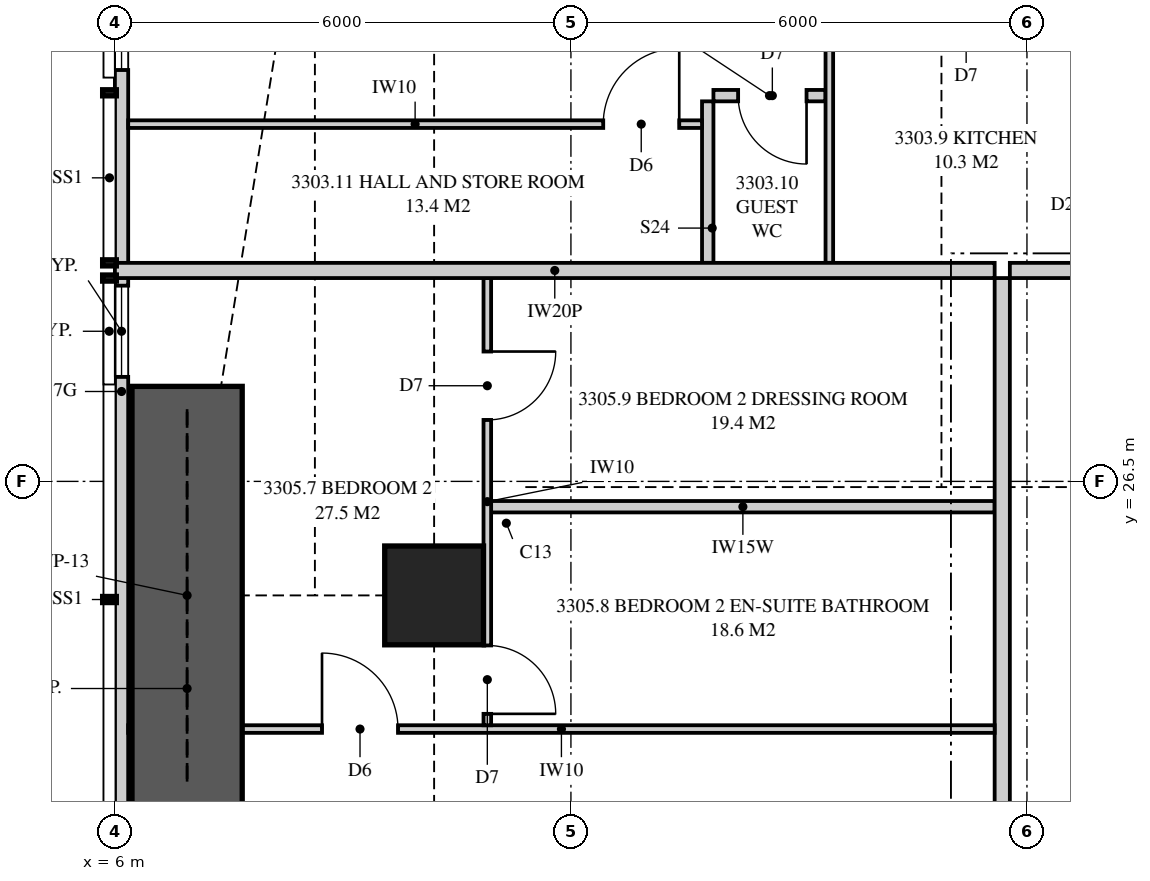
"""IFC4 building model, lengths in metres.
Left out: names, types, materials, properties, quantities, classifications, styles, units other than length and angle.
Written with IfcOpenShell. Run it as: python <this file> out.ifc"""

import sys

from ifc_helpers import new_model, si_unit, direction, frame, frame_2d, origin, origin_2d, place, context, subcontext, project, spatial, polyline, rectangle, outline, extrude, element, fill, save


model = new_model("IFC4")
c1 = context("Model", 3, precision=1e-05, world=origin(), true_north=direction((0.0, 1.0)))
c2 = subcontext(c1, "Body", "Model", "MODEL_VIEW")
j1 = project(units=[si_unit("LENGTHUNIT", "METRE"), si_unit("PLANEANGLEUNIT", "RADIAN")], contexts=[c1])
p1 = place(None, origin())
s1 = spatial("IfcSite", under=j1, at=p1, CompositionType="ELEMENT")
p2 = place(p1, origin())
s2 = spatial("IfcBuilding", under=s1, at=p2, CompositionType="ELEMENT")
p3 = place(p2, frame((0.0, 0.0, 121.6)))
s3 = spatial("IfcBuildingStorey", under=s2, at=p3, CompositionType="ELEMENT", Elevation=121.6)
p4 = place(p3, frame((10.2, 25.0, 0.0), z_axis=(0.0, 0.0, 1.0), x_axis=(1.0, 0.0, 0.0)))
e1 = element("IfcColumn", 1, at=p4, inside=s3, PredefinedType="COLUMN", context=c2, shape_type="SweptSolid", body=[
    extrude(rectangle(XDim=1.3, YDim=1.3, at=origin_2d()), origin(), (0.0, 0.0, 1.0), 3.35),
])
p5 = place(p3, frame((6.087, 34.949, 0.0), z_axis=(0.0, 0.0, 1.0), x_axis=(0.0, -1.0, 0.0)))
e2 = element("IfcWall", 2, at=p5, inside=s3, PredefinedType="SOLIDWALL", context=c2, shape_type="SweptSolid", body=[
    extrude(outline(polyline([(0.0, 0.0), (14.532, 0.0), (14.532, 2.15), (9.949, 2.15), (9.949, 3.11), (9.823, 3.11), (9.823, 2.15), (9.73, 2.15), (9.73, 3.11), (0.0, 3.11), (0.0, 0.0)])), frame((0.0, 0.087, 0.0), z_axis=(0.0, -1.0, 0.0), x_axis=(1.0, 0.0, 0.0)), (0.0, 0.0, 1.0), 0.175),
])
p6 = place(p5, frame((0.636, 0.0, 0.4)))
e3 = element("IfcOpeningElement", 3, at=p6, cuts=e2, PredefinedType="OPENING", context=c2, shape_type="SweptSolid", body=[
    extrude(rectangle(XDim=2.4, YDim=1.7, at=frame_2d((1.2, 0.85))), frame((0.0, 0.097, 0.0), z_axis=(0.0, -1.0, 0.0), x_axis=(1.0, 0.0, 0.0)), (0.0, 0.0, 1.0), 0.195),
])
p7 = place(p5, frame((5.874, 0.0, 0.4)))
e4 = element("IfcOpeningElement", 4, at=p7, cuts=e2, PredefinedType="OPENING", context=c2, shape_type="SweptSolid", body=[
    extrude(rectangle(XDim=1.2, YDim=1.7, at=frame_2d((0.6, 0.85))), frame((0.0, 0.097, 0.0), z_axis=(0.0, -1.0, 0.0), x_axis=(1.0, 0.0, 0.0)), (0.0, 0.0, 1.0), 0.195),
])
p8 = place(p3, frame((17.775, 29.275, 0.0), z_axis=(0.0, 0.0, 1.0), x_axis=(1.0, 0.0, 0.0)))
e5 = element("IfcWall", 5, at=p8, inside=s3, PredefinedType="PARTITIONING", context=c2, shape_type="SweptSolid", body=[
    extrude(outline(polyline([(0.0, 0.0), (18.925, 0.0), (18.925, 3.11), (10.312, 3.11), (10.312, 2.541), (9.638, 2.541), (9.638, 3.11), (0.0, 3.11), (0.0, 0.0)])), frame((0.0, 0.1, 0.0), z_axis=(0.0, -1.0, 0.0), x_axis=(1.0, 0.0, 0.0)), (0.0, 0.0, 1.0), 0.2),
])
p9 = place(p8, frame((3.125, 0.0, 0.0)))
e6 = element("IfcOpeningElement", 6, at=p9, cuts=e5, PredefinedType="OPENING", context=c2, shape_type="SweptSolid", body=[
    extrude(rectangle(XDim=1.05, YDim=2.2, at=frame_2d((0.525, 1.1))), frame((0.0, 0.11, 0.0), z_axis=(0.0, -1.0, 0.0), x_axis=(1.0, 0.0, 0.0)), (0.0, 0.0, 1.0), 0.22),
])
p10 = place(p3, frame((15.4, 32.325, 0.0), z_axis=(0.0, 0.0, 1.0), x_axis=(0.0, -1.0, 0.0)))
e7 = element("IfcWall", 7, at=p10, inside=s3, PredefinedType="PARTITIONING", context=c2, shape_type="SweptSolid", body=[
    extrude(rectangle(XDim=2.95, YDim=0.1, at=frame_2d((1.475, 0.0))), origin(), (0.0, 0.0, 1.0), 3.11),
])
p11 = place(p3, frame((13.875, 31.575, 0.0), z_axis=(0.0, 0.0, 1.0), x_axis=(1.0, 0.0, 0.0)))
e8 = element("IfcWall", 8, at=p11, inside=s3, PredefinedType="PLUMBINGWALL", context=c2, shape_type="SweptSolid", body=[
    extrude(rectangle(XDim=1.475, YDim=0.15, at=frame_2d((0.738, 0.0))), origin(), (0.0, 0.0, 1.0), 3.11),
])
p12 = place(p11, frame((0.325, 0.0, 0.0)))
e9 = element("IfcOpeningElement", 9, at=p12, cuts=e8, PredefinedType="OPENING", context=c2, shape_type="SweptSolid", body=[
    extrude(rectangle(XDim=0.9, YDim=2.1, at=frame_2d((0.45, 1.05))), frame((0.0, 0.085, 0.0), z_axis=(0.0, -1.0, 0.0), x_axis=(1.0, 0.0, 0.0)), (0.0, 0.0, 1.0), 0.17),
])
p13 = place(p3, frame((13.8, 31.5, 0.0), z_axis=(0.0, 0.0, 1.0), x_axis=(0.0, -1.0, 0.0)))
e10 = element("IfcWall", 10, at=p13, inside=s3, PredefinedType="PLUMBINGWALL", context=c2, shape_type="SweptSolid", body=[
    extrude(rectangle(XDim=2.125, YDim=0.15, at=frame_2d((1.062, 0.0))), origin(), (0.0, 0.0, 1.0), 3.11),
])
p14 = place(p3, frame((6.175, 31.2, 0.0), z_axis=(0.0, 0.0, 1.0), x_axis=(1.0, 0.0, 0.0)))
e11 = element("IfcWall", 11, at=p14, inside=s3, PredefinedType="PARTITIONING", context=c2, shape_type="SweptSolid", body=[
    extrude(outline(polyline([(0.0, 0.0), (7.55, 0.0), (7.55, 3.11), (5.285, 3.11), (5.285, 2.51), (2.765, 2.51), (2.765, 3.11), (2.744, 3.11), (2.744, 2.541), (2.652, 2.541), (2.652, 2.15), (0.909, 2.15), (0.909, 3.11), (0.0, 3.11), (0.0, 0.0)])), frame((0.0, 0.05, 0.0), z_axis=(0.0, -1.0, 0.0), x_axis=(1.0, 0.0, 0.0)), (0.0, 0.0, 1.0), 0.1),
])
p15 = place(p14, frame((6.25, 0.0, 0.0)))
e12 = element("IfcOpeningElement", 12, at=p15, cuts=e11, PredefinedType="OPENING", context=c2, shape_type="SweptSolid", body=[
    extrude(rectangle(XDim=1.0, YDim=2.1, at=frame_2d((0.5, 1.05))), frame((0.0, 0.06, 0.0), z_axis=(0.0, -1.0, 0.0), x_axis=(1.0, 0.0, 0.0)), (0.0, 0.0, 1.0), 0.12),
])
p16 = place(p3, frame((6.0, 29.275, 0.0), z_axis=(0.0, 0.0, 1.0), x_axis=(1.0, 0.0, 0.0)))
e13 = element("IfcWall", 13, at=p16, inside=s3, PredefinedType="PARTITIONING", context=c2, shape_type="SweptSolid", body=[
    extrude(outline(polyline([(0.0, 0.0), (11.575, 0.0), (11.575, 3.11), (11.212, 3.11), (11.212, 2.541), (10.538, 2.541), (10.538, 3.11), (5.51, 3.11), (5.51, 2.51), (2.969, 2.51), (2.969, 2.541), (2.565, 2.541), (2.565, 2.15), (0.721, 2.15), (0.721, 3.11), (0.0, 3.11), (0.0, 0.0)])), frame((0.0, 0.1, 0.0), z_axis=(0.0, -1.0, 0.0), x_axis=(1.0, 0.0, 0.0)), (0.0, 0.0, 1.0), 0.2),
])
p17 = place(p3, frame((6.175, 23.242, 0.0), z_axis=(0.0, 0.0, 1.0), x_axis=(1.0, 0.0, 0.0)))
e14 = element("IfcWall", 14, at=p17, inside=s3, PredefinedType="PARTITIONING", context=c2, shape_type="SweptSolid", body=[
    extrude(outline(polyline([(0.529, 2.15), (0.0, 2.15), (0.0, 0.0), (0.529, 0.0), (0.529, 0.268), (1.021, 0.268), (1.021, 0.0), (11.4, 0.0), (11.4, 3.11), (5.285, 3.11), (5.285, 2.51), (2.765, 2.51), (2.765, 3.11), (1.635, 3.11), (1.635, 2.15), (1.021, 2.15), (1.021, 1.882), (0.529, 1.882), (0.529, 2.15)])), frame((0.0, 0.05, 0.0), z_axis=(0.0, -1.0, 0.0), x_axis=(1.0, 0.0, 0.0)), (0.0, 0.0, 1.0), 0.1),
])
p18 = place(p17, frame((2.55, 0.0, 0.0)))
e15 = element("IfcOpeningElement", 15, at=p18, cuts=e14, PredefinedType="OPENING", context=c2, shape_type="SweptSolid", body=[
    extrude(rectangle(XDim=1.0, YDim=2.1, at=frame_2d((0.5, 1.05))), frame((0.0, 0.06, 0.0), z_axis=(0.0, -1.0, 0.0), x_axis=(1.0, 0.0, 0.0)), (0.0, 0.0, 1.0), 0.12),
])
p19 = place(p3, frame((17.675, 19.7, 0.0), z_axis=(0.0, 0.0, 1.0), x_axis=(0.0, 1.0, 0.0)))
e16 = element("IfcWall", 16, at=p19, inside=s3, PredefinedType="PARTITIONING", context=c2, shape_type="SweptSolid", body=[
    extrude(outline(polyline([(0.0, 0.0), (9.475, 0.0), (9.475, 3.11), (7.062, 3.11), (7.062, 2.541), (6.388, 2.541), (6.388, 3.11), (0.0, 3.11), (0.0, 0.0)])), frame((0.0, 0.1, 0.0), z_axis=(0.0, -1.0, 0.0), x_axis=(1.0, 0.0, 0.0)), (0.0, 0.0, 1.0), 0.2),
])
p20 = place(p3, frame((10.9, 23.292, 0.0), z_axis=(0.0, 0.0, 1.0), x_axis=(0.0, 1.0, 0.0)))
e17 = element("IfcWall", 17, at=p20, inside=s3, PredefinedType="PARTITIONING", context=c2, shape_type="SweptSolid", body=[
    extrude(outline(polyline([(0.0, 0.0), (5.883, 0.0), (5.883, 3.11), (5.883, 2.51), (1.768, 2.51), (0.0, 2.51), (0.0, 3.11), (0.0, 0.0)])), frame((0.0, 0.05, 0.0), z_axis=(0.0, -1.0, 0.0), x_axis=(1.0, 0.0, 0.0)), (0.0, 0.0, 1.0), 0.1),
])
p21 = place(p20, frame((0.15, 0.0, 0.0)))
e18 = element("IfcOpeningElement", 18, at=p21, cuts=e17, PredefinedType="OPENING", context=c2, shape_type="SweptSolid", body=[
    extrude(rectangle(XDim=0.9, YDim=2.1, at=frame_2d((0.45, 1.05))), frame((0.0, 0.06, 0.0), z_axis=(0.0, -1.0, 0.0), x_axis=(1.0, 0.0, 0.0)), (0.0, 0.0, 1.0), 0.12),
])
p22 = place(p20, frame((4.017, 0.0, 0.0)))
e19 = element("IfcOpeningElement", 19, at=p22, cuts=e17, PredefinedType="OPENING", context=c2, shape_type="SweptSolid", body=[
    extrude(rectangle(XDim=0.9, YDim=2.1, at=frame_2d((0.45, 1.05))), frame((0.0, 0.06, 0.0), z_axis=(0.0, -1.0, 0.0), x_axis=(1.0, 0.0, 0.0)), (0.0, 0.0, 1.0), 0.12),
])
p23 = place(p3, frame((10.95, 26.167, 0.0), z_axis=(0.0, 0.0, 1.0), x_axis=(1.0, 0.0, 0.0)))
e20 = element("IfcWall", 20, at=p23, inside=s3, PredefinedType="PLUMBINGWALL", context=c2, shape_type="SweptSolid", body=[
    extrude(outline(polyline([(0.0, 0.0), (6.625, 0.0), (6.625, 3.11), (6.625, 2.541), (0.535, 2.541), (0.535, 2.51), (0.0, 2.51), (0.0, 3.11), (0.0, 0.0)])), frame((0.0, 0.075, 0.0), z_axis=(0.0, -1.0, 0.0), x_axis=(1.0, 0.0, 0.0)), (0.0, 0.0, 1.0), 0.15),
])
p24 = place(p3, frame((6.95, 22.25, 0.0), z_axis=(0.0, 0.0, 1.0), x_axis=(0.0, 1.0, 0.0)))
e21 = element("IfcWall", 21, at=p24, inside=s3, PredefinedType="SHEAR", context=c2, shape_type="SweptSolid", body=[
    extrude(rectangle(XDim=5.5, YDim=1.45, at=frame_2d((2.75, 0.0))), origin(), (0.0, 0.0, 1.0), 3.35),
])
p25 = place(p6, origin())
e22 = element("IfcWindow", 22, at=p25, inside=s3, PartitioningType="SINGLE_PANEL", PredefinedType="WINDOW", context=c2, shape_type="SweptSolid", body=[
    extrude(rectangle(XDim=2.4, YDim=1.7, at=frame_2d((1.2, 0.85))), frame((0.0, 0.03, 0.0), z_axis=(0.0, -1.0, 0.0), x_axis=(1.0, 0.0, 0.0)), (0.0, 0.0, 1.0), 0.06),
])
fill(e3, e22)
p26 = place(p7, origin())
e23 = element("IfcWindow", 23, at=p26, inside=s3, PartitioningType="SINGLE_PANEL", PredefinedType="WINDOW", context=c2, shape_type="SweptSolid", body=[
    extrude(rectangle(XDim=1.2, YDim=1.7, at=frame_2d((0.6, 0.85))), frame((0.0, 0.03, 0.0), z_axis=(0.0, -1.0, 0.0), x_axis=(1.0, 0.0, 0.0)), (0.0, 0.0, 1.0), 0.06),
])
fill(e4, e23)
p27 = place(p12, frame((0.9, 0.0, 0.0), z_axis=(0.0, 0.0, 1.0), x_axis=(-1.0, 0.0, 0.0)))
e24 = element("IfcDoor", 24, at=p27, inside=s3, OperationType="SINGLE_SWING_LEFT", PredefinedType="DOOR", context=c2, shape_type="SweptSolid", body=[
    extrude(rectangle(XDim=0.9, YDim=2.1, at=frame_2d((0.45, 1.05))), frame((0.0, 0.025, 0.0), z_axis=(0.0, -1.0, 0.0), x_axis=(1.0, 0.0, 0.0)), (0.0, 0.0, 1.0), 0.05),
])
fill(e9, e24)
p28 = place(p15, origin())
e25 = element("IfcDoor", 25, at=p28, inside=s3, OperationType="SINGLE_SWING_RIGHT", PredefinedType="DOOR", context=c2, shape_type="SweptSolid", body=[
    extrude(rectangle(XDim=1.0, YDim=2.1, at=frame_2d((0.5, 1.05))), frame((0.0, 0.025, 0.0), z_axis=(0.0, -1.0, 0.0), x_axis=(1.0, 0.0, 0.0)), (0.0, 0.0, 1.0), 0.05),
])
fill(e12, e25)
p29 = place(p18, origin())
e26 = element("IfcDoor", 26, at=p29, inside=s3, OperationType="SINGLE_SWING_LEFT", PredefinedType="DOOR", context=c2, shape_type="SweptSolid", body=[
    extrude(rectangle(XDim=1.0, YDim=2.1, at=frame_2d((0.5, 1.05))), frame((0.0, 0.025, 0.0), z_axis=(0.0, -1.0, 0.0), x_axis=(1.0, 0.0, 0.0)), (0.0, 0.0, 1.0), 0.05),
])
fill(e15, e26)
p30 = place(p21, frame((0.9, 0.0, 0.0), z_axis=(0.0, 0.0, 1.0), x_axis=(-1.0, 0.0, 0.0)))
e27 = element("IfcDoor", 27, at=p30, inside=s3, OperationType="SINGLE_SWING_RIGHT", PredefinedType="DOOR", context=c2, shape_type="SweptSolid", body=[
    extrude(rectangle(XDim=0.9, YDim=2.1, at=frame_2d((0.45, 1.05))), frame((0.0, 0.025, 0.0), z_axis=(0.0, -1.0, 0.0), x_axis=(1.0, 0.0, 0.0)), (0.0, 0.0, 1.0), 0.05),
])
fill(e18, e27)
p31 = place(p22, frame((0.9, 0.0, 0.0), z_axis=(0.0, 0.0, 1.0), x_axis=(-1.0, 0.0, 0.0)))
e28 = element("IfcDoor", 28, at=p31, inside=s3, OperationType="SINGLE_SWING_LEFT", PredefinedType="DOOR", context=c2, shape_type="SweptSolid", body=[
    extrude(rectangle(XDim=0.9, YDim=2.1, at=frame_2d((0.45, 1.05))), frame((0.0, 0.025, 0.0), z_axis=(0.0, -1.0, 0.0), x_axis=(1.0, 0.0, 0.0)), (0.0, 0.0, 1.0), 0.05),
])
fill(e19, e28)
save(model, sys.argv[1])
